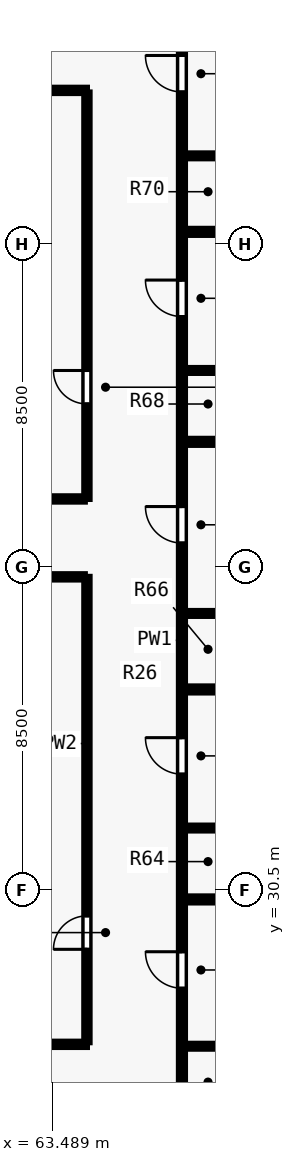
"""IFC4 building model, lengths in metres.
Left out: names, types, materials, properties, quantities, classifications, styles, units other than length and angle.
Written with IfcOpenShell. Run it as: python <this file> out.ifc"""

import sys

from ifc_helpers import new_model, si_unit, direction, frame, frame_2d, origin, place, context, subcontext, project, spatial, rectangle, extrude, element, fill, save


model = new_model("IFC4")
c1 = context("Model", 3, precision=1e-05, world=origin(), true_north=direction((0.0, 1.0)))
c2 = subcontext(c1, "Body", "Model", "MODEL_VIEW")
j1 = project(units=[si_unit("LENGTHUNIT", "METRE"), si_unit("PLANEANGLEUNIT", "RADIAN")], contexts=[c1])
p1 = place(None, origin())
s1 = spatial("IfcSite", under=j1, at=p1, CompositionType="ELEMENT")
p2 = place(p1, origin())
s2 = spatial("IfcBuilding", under=s1, at=p2, CompositionType="ELEMENT")
p3 = place(p2, frame((0.0, 0.0, 90.0)))
s3 = spatial("IfcBuildingStorey", under=s2, at=p3, CompositionType="ELEMENT", Elevation=90.0)
p4 = place(p3, frame((66.9, 24.015, 0.0), z_axis=(0.0, 0.0, 1.0), x_axis=(0.0, 1.0, 0.0)))
e1 = element("IfcWall", 1, at=p4, inside=s3, PredefinedType="PARTITIONING", context=c2, shape_type="SweptSolid", body=[
    extrude(rectangle(XDim=29.97, YDim=0.16, at=frame_2d((14.985, 0.0))), origin(), (0.0, 0.0, 1.0), 3.28),
])
p5 = place(p4, frame((3.911, 0.0, 0.0)))
e2 = element("IfcOpeningElement", 2, at=p5, cuts=e1, PredefinedType="OPENING", context=c2, shape_type="SweptSolid", body=[
    extrude(rectangle(XDim=0.96, YDim=2.15, at=frame_2d((0.48, 1.075))), frame((0.0, 0.09, 0.0), z_axis=(0.0, -1.0, 0.0), x_axis=(1.0, 0.0, 0.0)), (0.0, 0.0, 1.0), 0.18),
])
p6 = place(p4, frame((9.544, 0.0, 0.0)))
e3 = element("IfcOpeningElement", 3, at=p6, cuts=e1, PredefinedType="OPENING", context=c2, shape_type="SweptSolid", body=[
    extrude(rectangle(XDim=0.96, YDim=2.15, at=frame_2d((0.48, 1.075))), frame((0.0, 0.09, 0.0), z_axis=(0.0, -1.0, 0.0), x_axis=(1.0, 0.0, 0.0)), (0.0, 0.0, 1.0), 0.18),
])
p7 = place(p4, frame((15.625, 0.0, 0.0)))
e4 = element("IfcOpeningElement", 4, at=p7, cuts=e1, PredefinedType="OPENING", context=c2, shape_type="SweptSolid", body=[
    extrude(rectangle(XDim=0.96, YDim=2.15, at=frame_2d((0.48, 1.075))), frame((0.0, 0.09, 0.0), z_axis=(0.0, -1.0, 0.0), x_axis=(1.0, 0.0, 0.0)), (0.0, 0.0, 1.0), 0.18),
])
p8 = place(p4, frame((21.584, 0.0, 0.0)))
e5 = element("IfcOpeningElement", 5, at=p8, cuts=e1, PredefinedType="OPENING", context=c2, shape_type="SweptSolid", body=[
    extrude(rectangle(XDim=0.96, YDim=2.15, at=frame_2d((0.48, 1.075))), frame((0.0, 0.09, 0.0), z_axis=(0.0, -1.0, 0.0), x_axis=(1.0, 0.0, 0.0)), (0.0, 0.0, 1.0), 0.18),
])
p9 = place(p4, frame((27.494, 0.0, 0.0)))
e6 = element("IfcOpeningElement", 6, at=p9, cuts=e1, PredefinedType="OPENING", context=c2, shape_type="SweptSolid", body=[
    extrude(rectangle(XDim=0.96, YDim=2.15, at=frame_2d((0.48, 1.075))), frame((0.0, 0.09, 0.0), z_axis=(0.0, -1.0, 0.0), x_axis=(1.0, 0.0, 0.0)), (0.0, 0.0, 1.0), 0.18),
])
p10 = place(p3, frame((39.6, 26.45, 0.0), z_axis=(0.0, 0.0, 1.0), x_axis=(1.0, 0.0, 0.0)))
e7 = element("IfcWall", 7, at=p10, inside=s3, PredefinedType="PARTITIONING", context=c2, shape_type="SweptSolid", body=[
    extrude(rectangle(XDim=24.8, YDim=0.14, at=frame_2d((12.4, 0.0))), origin(), (0.0, 0.0, 1.0), 3.28),
])
p11 = place(p10, frame((1.2, 0.0, 0.0)))
e8 = element("IfcOpeningElement", 8, at=p11, cuts=e7, PredefinedType="OPENING", context=c2, shape_type="SweptSolid", body=[
    extrude(rectangle(XDim=0.88, YDim=2.1, at=frame_2d((0.44, 1.05))), frame((0.0, 0.08, 0.0), z_axis=(0.0, -1.0, 0.0), x_axis=(1.0, 0.0, 0.0)), (0.0, 0.0, 1.0), 0.16),
])
p12 = place(p10, frame((8.9, 0.0, 0.0)))
e9 = element("IfcOpeningElement", 9, at=p12, cuts=e7, PredefinedType="OPENING", context=c2, shape_type="SweptSolid", body=[
    extrude(rectangle(XDim=0.88, YDim=2.1, at=frame_2d((0.44, 1.05))), frame((0.0, 0.08, 0.0), z_axis=(0.0, -1.0, 0.0), x_axis=(1.0, 0.0, 0.0)), (0.0, 0.0, 1.0), 0.16),
])
p13 = place(p10, frame((19.4, 0.0, 0.0)))
e10 = element("IfcOpeningElement", 10, at=p13, cuts=e7, PredefinedType="OPENING", context=c2, shape_type="SweptSolid", body=[
    extrude(rectangle(XDim=0.88, YDim=2.1, at=frame_2d((0.44, 1.05))), frame((0.0, 0.08, 0.0), z_axis=(0.0, -1.0, 0.0), x_axis=(1.0, 0.0, 0.0)), (0.0, 0.0, 1.0), 0.16),
])
p14 = place(p3, frame((39.6, 51.55, 0.0), z_axis=(0.0, 0.0, 1.0), x_axis=(1.0, 0.0, 0.0)))
e11 = element("IfcWall", 11, at=p14, inside=s3, PredefinedType="PARTITIONING", context=c2, shape_type="SweptSolid", body=[
    extrude(rectangle(XDim=24.8, YDim=0.14, at=frame_2d((12.4, 0.0))), origin(), (0.0, 0.0, 1.0), 3.28),
])
p15 = place(p14, frame((2.2, 0.0, 0.0)))
e12 = element("IfcOpeningElement", 12, at=p15, cuts=e11, PredefinedType="OPENING", context=c2, shape_type="SweptSolid", body=[
    extrude(rectangle(XDim=0.88, YDim=2.1, at=frame_2d((0.44, 1.05))), frame((0.0, 0.08, 0.0), z_axis=(0.0, -1.0, 0.0), x_axis=(1.0, 0.0, 0.0)), (0.0, 0.0, 1.0), 0.16),
])
p16 = place(p14, frame((12.9, 0.0, 0.0)))
e13 = element("IfcOpeningElement", 13, at=p16, cuts=e11, PredefinedType="OPENING", context=c2, shape_type="SweptSolid", body=[
    extrude(rectangle(XDim=0.88, YDim=2.1, at=frame_2d((0.44, 1.05))), frame((0.0, 0.08, 0.0), z_axis=(0.0, -1.0, 0.0), x_axis=(1.0, 0.0, 0.0)), (0.0, 0.0, 1.0), 0.16),
])
p17 = place(p14, frame((22.4, 0.0, 0.0)))
e14 = element("IfcOpeningElement", 14, at=p17, cuts=e11, PredefinedType="OPENING", context=c2, shape_type="SweptSolid", body=[
    extrude(rectangle(XDim=0.88, YDim=2.1, at=frame_2d((0.44, 1.05))), frame((0.0, 0.08, 0.0), z_axis=(0.0, -1.0, 0.0), x_axis=(1.0, 0.0, 0.0)), (0.0, 0.0, 1.0), 0.16),
])
p18 = place(p3, frame((64.4, 26.505, 0.0), z_axis=(0.0, 0.0, 1.0), x_axis=(0.0, 1.0, 0.0)))
e15 = element("IfcWall", 15, at=p18, inside=s3, PredefinedType="PARTITIONING", context=c2, shape_type="SweptSolid", body=[
    extrude(rectangle(XDim=12.245, YDim=0.14, at=frame_2d((6.123, 0.0))), origin(), (0.0, 0.0, 1.0), 3.28),
])
p19 = place(p18, frame((2.445, 0.0, 0.0)))
e16 = element("IfcOpeningElement", 16, at=p19, cuts=e15, PredefinedType="OPENING", context=c2, shape_type="SweptSolid", body=[
    extrude(rectangle(XDim=0.88, YDim=2.1, at=frame_2d((0.44, 1.05))), frame((0.0, 0.08, 0.0), z_axis=(0.0, -1.0, 0.0), x_axis=(1.0, 0.0, 0.0)), (0.0, 0.0, 1.0), 0.16),
])
p20 = place(p3, frame((64.4, 40.8, 0.0), z_axis=(0.0, 0.0, 1.0), x_axis=(0.0, 1.0, 0.0)))
e17 = element("IfcWall", 17, at=p20, inside=s3, PredefinedType="PARTITIONING", context=c2, shape_type="SweptSolid", body=[
    extrude(rectangle(XDim=10.695, YDim=0.14, at=frame_2d((5.348, 0.0))), origin(), (0.0, 0.0, 1.0), 3.28),
])
p21 = place(p20, frame((2.5, 0.0, 0.0)))
e18 = element("IfcOpeningElement", 18, at=p21, cuts=e17, PredefinedType="OPENING", context=c2, shape_type="SweptSolid", body=[
    extrude(rectangle(XDim=0.88, YDim=2.1, at=frame_2d((0.44, 1.05))), frame((0.0, 0.08, 0.0), z_axis=(0.0, -1.0, 0.0), x_axis=(1.0, 0.0, 0.0)), (0.0, 0.0, 1.0), 0.16),
])
for number, where, z_axis, x_axis in (
    (19, (60.76, 38.75, 0.0), (0.0, 0.0, 1.0), (1.0, 0.0, 0.0)),
    (20, (60.76, 40.8, 0.0), (0.0, 0.0, 1.0), (1.0, 0.0, 0.0)),
):
    element("IfcWall", number, at=place(p3, frame(where, z_axis=z_axis, x_axis=x_axis)), inside=s3, PredefinedType="PARTITIONING", context=c2, shape_type="SweptSolid", body=[
        extrude(rectangle(XDim=3.585, YDim=0.14, at=frame_2d((1.792, 0.0))), origin(), (0.0, 0.0, 1.0), 3.28),
    ])
p22 = place(p3, frame((66.965, 26.4, 0.0), z_axis=(0.0, 0.0, 1.0), x_axis=(1.0, 0.0, 0.0)))
e21 = element("IfcWall", 21, at=p22, inside=s3, PredefinedType="PLUMBINGWALL", context=c2, shape_type="SweptSolid", body=[
    extrude(rectangle(XDim=2.235, YDim=0.13, at=frame_2d((1.117, 0.0))), origin(), (0.0, 0.0, 1.0), 3.28),
])
p23 = place(p3, frame((66.965, 30.262, 0.0), z_axis=(0.0, 0.0, 1.0), x_axis=(1.0, 0.0, 0.0)))
e22 = element("IfcWall", 22, at=p23, inside=s3, PredefinedType="PARTITIONING", context=c2, shape_type="SweptSolid", body=[
    extrude(rectangle(XDim=10.19, YDim=0.16, at=frame_2d((5.095, 0.0))), origin(), (0.0, 0.0, 1.0), 3.28),
])
p24 = place(p3, frame((66.965, 32.141, 0.0), z_axis=(0.0, 0.0, 1.0), x_axis=(1.0, 0.0, 0.0)))
e23 = element("IfcWall", 23, at=p24, inside=s3, PredefinedType="PLUMBINGWALL", context=c2, shape_type="SweptSolid", body=[
    extrude(rectangle(XDim=2.235, YDim=0.13, at=frame_2d((1.117, 0.0))), origin(), (0.0, 0.0, 1.0), 2.439),
])
p25 = place(p3, frame((66.965, 35.788, 0.0), z_axis=(0.0, 0.0, 1.0), x_axis=(1.0, 0.0, 0.0)))
e24 = element("IfcWall", 24, at=p25, inside=s3, PredefinedType="PARTITIONING", context=c2, shape_type="SweptSolid", body=[
    extrude(rectangle(XDim=10.19, YDim=0.16, at=frame_2d((5.095, 0.0))), origin(), (0.0, 0.0, 1.0), 3.28),
])
p26 = place(p3, frame((66.965, 37.788, 0.0), z_axis=(0.0, 0.0, 1.0), x_axis=(1.0, 0.0, 0.0)))
e25 = element("IfcWall", 25, at=p26, inside=s3, PredefinedType="PLUMBINGWALL", context=c2, shape_type="SweptSolid", body=[
    extrude(rectangle(XDim=2.235, YDim=0.13, at=frame_2d((1.117, 0.0))), origin(), (0.0, 0.0, 1.0), 3.28),
])
p27 = place(p3, frame((66.965, 42.302, 0.0), z_axis=(0.0, 0.0, 1.0), x_axis=(1.0, 0.0, 0.0)))
e26 = element("IfcWall", 26, at=p27, inside=s3, PredefinedType="PARTITIONING", context=c2, shape_type="SweptSolid", body=[
    extrude(rectangle(XDim=10.19, YDim=0.16, at=frame_2d((5.095, 0.0))), origin(), (0.0, 0.0, 1.0), 3.28),
])
p28 = place(p3, frame((66.965, 44.181, 0.0), z_axis=(0.0, 0.0, 1.0), x_axis=(1.0, 0.0, 0.0)))
e27 = element("IfcWall", 27, at=p28, inside=s3, PredefinedType="PLUMBINGWALL", context=c2, shape_type="SweptSolid", body=[
    extrude(rectangle(XDim=2.235, YDim=0.13, at=frame_2d((1.117, 0.0))), origin(), (0.0, 0.0, 1.0), 3.28),
])
p29 = place(p3, frame((66.965, 47.827, 0.0), z_axis=(0.0, 0.0, 1.0), x_axis=(1.0, 0.0, 0.0)))
e28 = element("IfcWall", 28, at=p29, inside=s3, PredefinedType="PARTITIONING", context=c2, shape_type="SweptSolid", body=[
    extrude(rectangle(XDim=10.19, YDim=0.16, at=frame_2d((5.095, 0.0))), origin(), (0.0, 0.0, 1.0), 3.28),
])
p30 = place(p3, frame((66.965, 49.827, 0.0), z_axis=(0.0, 0.0, 1.0), x_axis=(1.0, 0.0, 0.0)))
e29 = element("IfcWall", 29, at=p30, inside=s3, PredefinedType="PLUMBINGWALL", context=c2, shape_type="SweptSolid", body=[
    extrude(rectangle(XDim=2.235, YDim=0.13, at=frame_2d((1.117, 0.0))), origin(), (0.0, 0.0, 1.0), 3.28),
])
p31 = place(p19, origin())
e30 = element("IfcDoor", 30, at=p31, inside=s3, OperationType="SINGLE_SWING_LEFT", PredefinedType="DOOR", context=c2, shape_type="SweptSolid", body=[
    extrude(rectangle(XDim=0.88, YDim=2.1, at=frame_2d((0.44, 1.05))), frame((0.0, 0.025, 0.0), z_axis=(0.0, -1.0, 0.0), x_axis=(1.0, 0.0, 0.0)), (0.0, 0.0, 1.0), 0.05),
])
fill(e16, e30)
p32 = place(p21, origin())
e31 = element("IfcDoor", 31, at=p32, inside=s3, OperationType="SINGLE_SWING_RIGHT", PredefinedType="DOOR", context=c2, shape_type="SweptSolid", body=[
    extrude(rectangle(XDim=0.88, YDim=2.1, at=frame_2d((0.44, 1.05))), frame((0.0, 0.025, 0.0), z_axis=(0.0, -1.0, 0.0), x_axis=(1.0, 0.0, 0.0)), (0.0, 0.0, 1.0), 0.05),
])
fill(e18, e31)
p33 = place(p5, origin())
e32 = element("IfcDoor", 32, at=p33, inside=s3, OperationType="SINGLE_SWING_RIGHT", PredefinedType="DOOR", context=c2, shape_type="SweptSolid", body=[
    extrude(rectangle(XDim=0.96, YDim=2.15, at=frame_2d((0.48, 1.075))), frame((0.0, 0.025, 0.0), z_axis=(0.0, -1.0, 0.0), x_axis=(1.0, 0.0, 0.0)), (0.0, 0.0, 1.0), 0.05),
])
fill(e2, e32)
p34 = place(p6, origin())
e33 = element("IfcDoor", 33, at=p34, inside=s3, OperationType="SINGLE_SWING_RIGHT", PredefinedType="DOOR", context=c2, shape_type="SweptSolid", body=[
    extrude(rectangle(XDim=0.96, YDim=2.15, at=frame_2d((0.48, 1.075))), frame((0.0, 0.025, 0.0), z_axis=(0.0, -1.0, 0.0), x_axis=(1.0, 0.0, 0.0)), (0.0, 0.0, 1.0), 0.05),
])
fill(e3, e33)
p35 = place(p7, origin())
e34 = element("IfcDoor", 34, at=p35, inside=s3, OperationType="SINGLE_SWING_RIGHT", PredefinedType="DOOR", context=c2, shape_type="SweptSolid", body=[
    extrude(rectangle(XDim=0.96, YDim=2.15, at=frame_2d((0.48, 1.075))), frame((0.0, 0.025, 0.0), z_axis=(0.0, -1.0, 0.0), x_axis=(1.0, 0.0, 0.0)), (0.0, 0.0, 1.0), 0.05),
])
fill(e4, e34)
p36 = place(p8, origin())
e35 = element("IfcDoor", 35, at=p36, inside=s3, OperationType="SINGLE_SWING_RIGHT", PredefinedType="DOOR", context=c2, shape_type="SweptSolid", body=[
    extrude(rectangle(XDim=0.96, YDim=2.15, at=frame_2d((0.48, 1.075))), frame((0.0, 0.025, 0.0), z_axis=(0.0, -1.0, 0.0), x_axis=(1.0, 0.0, 0.0)), (0.0, 0.0, 1.0), 0.05),
])
fill(e5, e35)
p37 = place(p9, origin())
e36 = element("IfcDoor", 36, at=p37, inside=s3, OperationType="SINGLE_SWING_RIGHT", PredefinedType="DOOR", context=c2, shape_type="SweptSolid", body=[
    extrude(rectangle(XDim=0.96, YDim=2.15, at=frame_2d((0.48, 1.075))), frame((0.0, 0.025, 0.0), z_axis=(0.0, -1.0, 0.0), x_axis=(1.0, 0.0, 0.0)), (0.0, 0.0, 1.0), 0.05),
])
fill(e6, e36)
save(model, sys.argv[1])
